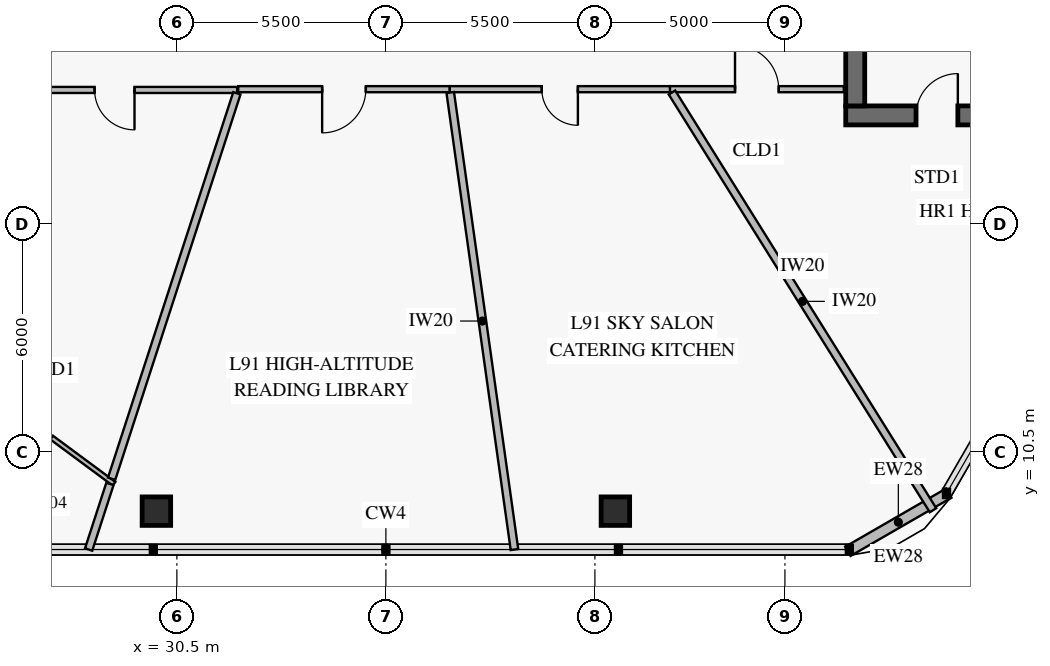
"""IFC4 building model, lengths in metres.
Left out: names, types, materials, properties, quantities, classifications, styles, units other than length and angle.
Written with IfcOpenShell. Run it as: python <this file> out.ifc"""

import sys

from ifc_helpers import new_model, si_unit, direction, frame, frame_2d, origin, origin_2d, place, context, subcontext, project, spatial, rectangle, extrude, element, fill, save


model = new_model("IFC4")
c1 = context("Model", 3, precision=1e-05, world=origin(), true_north=direction((0.0, 1.0)))
c2 = subcontext(c1, "Body", "Model", "MODEL_VIEW")
j1 = project(units=[si_unit("LENGTHUNIT", "METRE"), si_unit("PLANEANGLEUNIT", "RADIAN")], contexts=[c1])
p1 = place(None, origin())
s1 = spatial("IfcSite", under=j1, at=p1, CompositionType="ELEMENT")
p2 = place(p1, origin())
s2 = spatial("IfcBuilding", under=s1, at=p2, CompositionType="ELEMENT")
p3 = place(p2, frame((0.0, 0.0, 357.6)))
s3 = spatial("IfcBuildingStorey", under=s2, at=p3, CompositionType="ELEMENT", Elevation=357.6)
for number, where, z_axis, x_axis in (
    (1, (29.961, 8.936, 0.0), (0.0, 0.0, 1.0), (1.0, 0.0, 0.0)),
    (2, (42.039, 8.936, 0.0), (0.0, 0.0, 1.0), (1.0, 0.0, 0.0)),
):
    element("IfcColumn", number, at=place(p3, frame(where, z_axis=z_axis, x_axis=x_axis)), inside=s3, PredefinedType="COLUMN", context=c2, shape_type="SweptSolid", body=[
        extrude(rectangle(XDim=0.75, YDim=0.75, at=origin_2d()), origin(), (0.0, 0.0, 1.0), 3.35),
    ])
p4 = place(p3, frame((48.1, 19.35, 0.0), z_axis=(0.0, 0.0, 1.0), x_axis=(1.0, 0.0, 0.0)))
e3 = element("IfcWall", 3, at=p4, inside=s3, PredefinedType="SHEAR", context=c2, shape_type="SweptSolid", body=[
    extrude(rectangle(XDim=4.8, YDim=0.5, at=frame_2d((2.4, 0.0))), origin(), (0.0, 0.0, 1.0), 3.8),
])
p5 = place(p4, frame((1.85, 0.0, 0.0)))
e4 = element("IfcOpeningElement", 4, at=p5, cuts=e3, PredefinedType="OPENING", context=c2, shape_type="SweptSolid", body=[
    extrude(rectangle(XDim=1.1, YDim=2.15, at=frame_2d((0.55, 1.075))), frame((0.0, 0.262, 0.0), z_axis=(0.0, -1.0, 0.0), x_axis=(1.0, 0.0, 0.0)), (0.0, 0.0, 1.0), 0.524),
])
p6 = place(p3, frame((48.35, 19.6, 0.0), z_axis=(0.0, 0.0, 1.0), x_axis=(0.0, 1.0, 0.0)))
e5 = element("IfcWall", 5, at=p6, inside=s3, PredefinedType="SHEAR", context=c2, shape_type="SweptSolid", body=[
    extrude(rectangle(XDim=9.6, YDim=0.5, at=frame_2d((4.8, 0.0))), origin(), (0.0, 0.0, 1.0), 3.8),
])
p7 = place(p3, frame((50.811, 9.411, 0.0), z_axis=(0.0, 0.0, 1.0), x_axis=(-0.866023752521, -0.50000286006, 0.0)))
e6 = element("IfcWall", 6, at=p7, inside=s3, PredefinedType="SOLIDWALL", context=c2, shape_type="SweptSolid", body=[
    extrude(rectangle(XDim=3.065, YDim=0.28, at=frame_2d((1.532, 0.0))), origin(), (0.0, 0.0, 1.0), 3.35),
])
p8 = place(p3, frame((43.473, 20.04, 0.0), z_axis=(0.0, 0.0, 1.0), x_axis=(1.0, 0.0, 0.0)))
e7 = element("IfcWall", 7, at=p8, inside=s3, PredefinedType="PARTITIONING", context=c2, shape_type="SweptSolid", body=[
    extrude(rectangle(XDim=4.577, YDim=0.16, at=frame_2d((2.288, 0.0))), origin(), (0.0, 0.0, 1.0), 3.35),
])
p9 = place(p8, frame((1.713, 0.0, 0.0)))
e8 = element("IfcOpeningElement", 8, at=p9, cuts=e7, PredefinedType="OPENING", context=c2, shape_type="SweptSolid", body=[
    extrude(rectangle(XDim=1.15, YDim=2.2, at=frame_2d((0.575, 1.1))), frame((0.0, 0.092, 0.0), z_axis=(0.0, -1.0, 0.0), x_axis=(1.0, 0.0, 0.0)), (0.0, 0.0, 1.0), 0.184),
])
p10 = place(p3, frame((21.318, 15.227, 0.0), z_axis=(0.0, 0.0, 1.0), x_axis=(0.803862842845, -0.594814702149, 0.0)))
e9 = element("IfcWall", 9, at=p10, inside=s3, PredefinedType="PARTITIONING", context=c2, shape_type="SweptSolid", body=[
    extrude(rectangle(XDim=9.364, YDim=0.12, at=frame_2d((4.682, 0.0))), origin(), (0.0, 0.0, 1.0), 2.77),
])
p11 = place(p10, frame((1.928, 0.0, 0.0)))
e10 = element("IfcOpeningElement", 10, at=p11, cuts=e9, PredefinedType="OPENING", context=c2, shape_type="SweptSolid", body=[
    extrude(rectangle(XDim=0.95, YDim=2.1, at=frame_2d((0.475, 1.05))), frame((0.0, 0.072, 0.0), z_axis=(0.0, -1.0, 0.0), x_axis=(1.0, 0.0, 0.0)), (0.0, 0.0, 1.0), 0.144),
])
p12 = place(p10, frame((6.369, 0.0, 0.0)))
e11 = element("IfcOpeningElement", 11, at=p12, cuts=e9, PredefinedType="OPENING", context=c2, shape_type="SweptSolid", body=[
    extrude(rectangle(XDim=0.95, YDim=2.1, at=frame_2d((0.475, 1.05))), frame((0.0, 0.072, 0.0), z_axis=(0.0, -1.0, 0.0), x_axis=(1.0, 0.0, 0.0)), (0.0, 0.0, 1.0), 0.144),
])
p13 = place(p3, frame((25.635, 20.02, 0.0), z_axis=(0.0, 0.0, 1.0), x_axis=(1.0, 0.0, 0.0)))
e12 = element("IfcWall", 12, at=p13, inside=s3, PredefinedType="PARTITIONING", context=c2, shape_type="SweptSolid", body=[
    extrude(rectangle(XDim=6.452, YDim=0.16, at=frame_2d((3.226, 0.0))), origin(), (0.0, 0.0, 1.0), 3.35),
])
p14 = place(p13, frame((2.701, 0.0, 0.0)))
e13 = element("IfcOpeningElement", 13, at=p14, cuts=e12, PredefinedType="OPENING", context=c2, shape_type="SweptSolid", body=[
    extrude(rectangle(XDim=1.05, YDim=2.15, at=frame_2d((0.525, 1.075))), frame((0.0, 0.092, 0.0), z_axis=(0.0, -1.0, 0.0), x_axis=(1.0, 0.0, 0.0)), (0.0, 0.0, 1.0), 0.184),
])
p15 = place(p3, frame((32.114, 20.04, 0.0), z_axis=(0.0, 0.0, 1.0), x_axis=(1.0, 0.0, 0.0)))
e14 = element("IfcWall", 14, at=p15, inside=s3, PredefinedType="PARTITIONING", context=c2, shape_type="SweptSolid", body=[
    extrude(rectangle(XDim=5.567, YDim=0.16, at=frame_2d((2.783, 0.0))), origin(), (0.0, 0.0, 1.0), 2.8),
])
p16 = place(p15, frame((2.208, 0.0, 0.0)))
e15 = element("IfcOpeningElement", 15, at=p16, cuts=e14, PredefinedType="OPENING", context=c2, shape_type="SweptSolid", body=[
    extrude(rectangle(XDim=1.15, YDim=2.2, at=frame_2d((0.575, 1.1))), frame((0.0, 0.092, 0.0), z_axis=(0.0, -1.0, 0.0), x_axis=(1.0, 0.0, 0.0)), (0.0, 0.0, 1.0), 0.184),
])
p17 = place(p3, frame((37.681, 20.04, 0.0), z_axis=(0.0, 0.0, 1.0), x_axis=(1.0, 0.0, 0.0)))
e16 = element("IfcWall", 16, at=p17, inside=s3, PredefinedType="PARTITIONING", context=c2, shape_type="SweptSolid", body=[
    extrude(rectangle(XDim=5.792, YDim=0.16, at=frame_2d((2.896, 0.0))), origin(), (0.0, 0.0, 1.0), 2.8),
])
p18 = place(p17, frame((2.421, 0.0, 0.0)))
e17 = element("IfcOpeningElement", 17, at=p18, cuts=e16, PredefinedType="OPENING", context=c2, shape_type="SweptSolid", body=[
    extrude(rectangle(XDim=0.95, YDim=2.1, at=frame_2d((0.475, 1.05))), frame((0.0, 0.092, 0.0), z_axis=(0.0, -1.0, 0.0), x_axis=(1.0, 0.0, 0.0)), (0.0, 0.0, 1.0), 0.184),
])
p19 = place(p3, frame((43.528, 19.952, 0.0), z_axis=(0.0, 0.0, 1.0), x_axis=(0.529929518021, -0.848041688793, 0.0)))
e18 = element("IfcWall", 18, at=p19, inside=s3, PredefinedType="PARTITIONING", context=c2, shape_type="SweptSolid", body=[
    extrude(rectangle(XDim=12.961, YDim=0.2, at=frame_2d((6.48, 0.0))), origin(), (0.0, 0.0, 1.0), 2.77),
])
p20 = place(p3, frame((32.079, 19.932, 0.0), z_axis=(0.0, 0.0, 1.0), x_axis=(-0.309001185402, -0.951061652796, 0.0)))
e19 = element("IfcWall", 19, at=p20, inside=s3, PredefinedType="PARTITIONING", context=c2, shape_type="SweptSolid", body=[
    extrude(rectangle(XDim=10.666, YDim=0.2, at=frame_2d((5.333, 0.0))), origin(), (0.0, 0.0, 1.0), 3.35),
])
p21 = place(p3, frame((28.739, 9.652, 0.0), z_axis=(0.0, 0.0, 1.0), x_axis=(-0.308955291245, -0.951076562644, 0.0)))
e20 = element("IfcWall", 20, at=p21, inside=s3, PredefinedType="PARTITIONING", context=c2, shape_type="SweptSolid", body=[
    extrude(rectangle(XDim=1.815, YDim=0.2, at=frame_2d((0.908, 0.0))), origin(), (0.0, 0.0, 1.0), 2.77),
])
p22 = place(p3, frame((37.693, 19.952, 0.0), z_axis=(0.0, 0.0, 1.0), x_axis=(0.139155339123, -0.990270564843, 0.0)))
e21 = element("IfcWall", 21, at=p22, inside=s3, PredefinedType="PARTITIONING", context=c2, shape_type="SweptSolid", body=[
    extrude(rectangle(XDim=12.144, YDim=0.2, at=frame_2d((6.072, 0.0))), origin(), (0.0, 0.0, 1.0), 2.77),
])
p23 = place(p5, origin())
e22 = element("IfcDoor", 22, at=p23, inside=s3, OperationType="SINGLE_SWING_RIGHT", PredefinedType="USERDEFINED", context=c2, shape_type="SweptSolid", body=[
    extrude(rectangle(XDim=1.1, YDim=2.15, at=frame_2d((0.55, 1.075))), frame((0.0, 0.025, 0.0), z_axis=(0.0, -1.0, 0.0), x_axis=(1.0, 0.0, 0.0)), (0.0, 0.0, 1.0), 0.05),
])
fill(e4, e22)
p24 = place(p9, origin())
e23 = element("IfcDoor", 23, at=p24, inside=s3, OperationType="SINGLE_SWING_LEFT", PredefinedType="DOOR", context=c2, shape_type="SweptSolid", body=[
    extrude(rectangle(XDim=1.15, YDim=2.2, at=frame_2d((0.575, 1.1))), frame((0.0, 0.025, 0.0), z_axis=(0.0, -1.0, 0.0), x_axis=(1.0, 0.0, 0.0)), (0.0, 0.0, 1.0), 0.05),
])
fill(e8, e23)
p25 = place(p12, frame((0.95, 0.0, 0.0), z_axis=(0.0, 0.0, 1.0), x_axis=(-1.0, 0.0, 0.0)))
e24 = element("IfcDoor", 24, at=p25, inside=s3, OperationType="SINGLE_SWING_RIGHT", PredefinedType="DOOR", context=c2, shape_type="SweptSolid", body=[
    extrude(rectangle(XDim=0.95, YDim=2.1, at=frame_2d((0.475, 1.05))), frame((0.0, 0.025, 0.0), z_axis=(0.0, -1.0, 0.0), x_axis=(1.0, 0.0, 0.0)), (0.0, 0.0, 1.0), 0.05),
])
fill(e11, e24)
p26 = place(p14, frame((1.05, 0.0, 0.0), z_axis=(0.0, 0.0, 1.0), x_axis=(-1.0, 0.0, 0.0)))
e25 = element("IfcDoor", 25, at=p26, inside=s3, OperationType="SINGLE_SWING_LEFT", PredefinedType="DOOR", context=c2, shape_type="SweptSolid", body=[
    extrude(rectangle(XDim=1.05, YDim=2.15, at=frame_2d((0.525, 1.075))), frame((0.0, 0.025, 0.0), z_axis=(0.0, -1.0, 0.0), x_axis=(1.0, 0.0, 0.0)), (0.0, 0.0, 1.0), 0.05),
])
fill(e13, e25)
p27 = place(p16, frame((1.15, 0.0, 0.0), z_axis=(0.0, 0.0, 1.0), x_axis=(-1.0, 0.0, 0.0)))
e26 = element("IfcDoor", 26, at=p27, inside=s3, OperationType="SINGLE_SWING_RIGHT", PredefinedType="DOOR", context=c2, shape_type="SweptSolid", body=[
    extrude(rectangle(XDim=1.15, YDim=2.2, at=frame_2d((0.575, 1.1))), frame((0.0, 0.025, 0.0), z_axis=(0.0, -1.0, 0.0), x_axis=(1.0, 0.0, 0.0)), (0.0, 0.0, 1.0), 0.05),
])
fill(e15, e26)
p28 = place(p18, frame((0.95, 0.0, 0.0), z_axis=(0.0, 0.0, 1.0), x_axis=(-1.0, 0.0, 0.0)))
e27 = element("IfcDoor", 27, at=p28, inside=s3, OperationType="SINGLE_SWING_LEFT", PredefinedType="DOOR", context=c2, shape_type="SweptSolid", body=[
    extrude(rectangle(XDim=0.95, YDim=2.1, at=frame_2d((0.475, 1.05))), frame((0.0, 0.025, 0.0), z_axis=(0.0, -1.0, 0.0), x_axis=(1.0, 0.0, 0.0)), (0.0, 0.0, 1.0), 0.05),
])
fill(e17, e27)
save(model, sys.argv[1])
